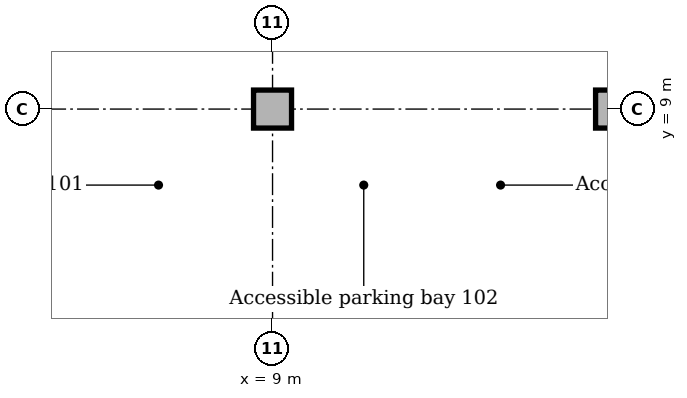
"""IFC4 building model, lengths in metres.
Left out: names, types, materials, properties, quantities, classifications, styles, units other than length and angle.
Written with IfcOpenShell. Run it as: python <this file> out.ifc"""

import sys

from ifc_helpers import new_model, si_unit, direction, frame, origin, origin_2d, place, context, subcontext, project, spatial, rectangle, extrude, element, save


model = new_model("IFC4")
c1 = context("Model", 3, precision=1e-05, world=origin(), true_north=direction((0.0, 1.0)))
c2 = subcontext(c1, "Body", "Model", "MODEL_VIEW")
j1 = project(units=[si_unit("LENGTHUNIT", "METRE"), si_unit("PLANEANGLEUNIT", "RADIAN")], contexts=[c1])
p1 = place(None, origin())
s1 = spatial("IfcSite", under=j1, at=p1, CompositionType="ELEMENT")
p2 = place(p1, origin())
s2 = spatial("IfcBuilding", under=s1, at=p2, CompositionType="ELEMENT")
p3 = place(p2, frame((0.0, 0.0, -5.0)))
s3 = spatial("IfcBuildingStorey", under=s2, at=p3, CompositionType="ELEMENT", Elevation=-5.0)
for number, where, z_axis, x_axis in (
    (1, (9.0, 9.0, 0.0), (0.0, 0.0, 1.0), (1.0, 0.0, 0.0)),
    (2, (18.0, 9.0, 0.0), (0.0, 0.0, 1.0), (1.0, 0.0, 0.0)),
):
    element("IfcColumn", number, at=place(p3, frame(where, z_axis=z_axis, x_axis=x_axis)), inside=s3, PredefinedType="COLUMN", context=c2, shape_type="SweptSolid", body=[
        extrude(rectangle(XDim=1.0, YDim=1.0, at=origin_2d()), origin(), (0.0, 0.0, 1.0), 4.7),
    ])
save(model, sys.argv[1])
